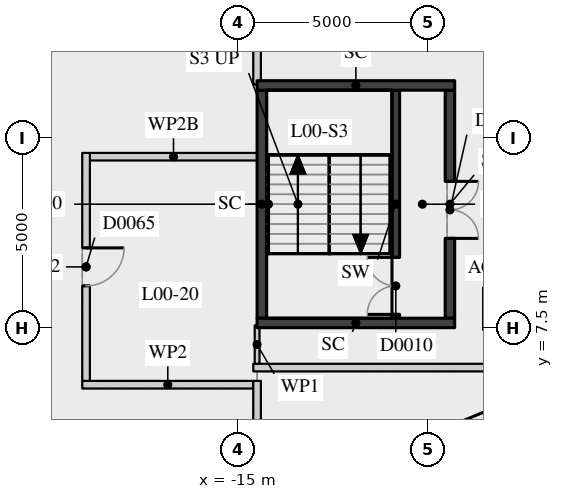
"""IFC4 building model, lengths in metres.
Left out: names, types, materials, properties, quantities, classifications, styles, units other than length and angle.
Written with IfcOpenShell. Run it as: python <this file> out.ifc"""

import sys

from ifc_helpers import new_model, si_unit, direction, frame, frame_2d, origin, place, context, subcontext, project, spatial, rectangle, extrude, element, fill, save


model = new_model("IFC4")
c1 = context("Model", 3, precision=1e-05, world=origin(), true_north=direction((0.0, 1.0)))
c2 = subcontext(c1, "Body", "Model", "MODEL_VIEW")
j1 = project(units=[si_unit("LENGTHUNIT", "METRE"), si_unit("PLANEANGLEUNIT", "RADIAN")], contexts=[c1])
p1 = place(None, origin())
s1 = spatial("IfcSite", under=j1, at=p1, CompositionType="ELEMENT")
p2 = place(p1, origin())
s2 = spatial("IfcBuilding", under=s1, at=p2, CompositionType="ELEMENT")
p3 = place(p2, origin())
s3 = spatial("IfcBuildingStorey", under=s2, at=p3, CompositionType="ELEMENT", Elevation=0.0)
p4 = place(p3, frame((-10.85, 7.75, 0.0), z_axis=(0.0, 0.0, 1.0), x_axis=(0.0, 1.0, 0.0)))
e1 = element("IfcWall", 1, at=p4, inside=s3, PredefinedType="SHEAR", context=c2, shape_type="SweptSolid", body=[
    extrude(rectangle(XDim=6.0, YDim=0.2, at=frame_2d((3.0, 0.0))), origin(), (0.0, 0.0, 1.0), 7.09),
])
p5 = place(p4, frame((0.1, 0.0, 0.0)))
e2 = element("IfcOpeningElement", 2, at=p5, cuts=e1, PredefinedType="OPENING", context=c2, shape_type="SweptSolid", body=[
    extrude(rectangle(XDim=1.5, YDim=2.1, at=frame_2d((0.75, 1.05))), frame((0.0, 0.11, 0.0), z_axis=(0.0, -1.0, 0.0), x_axis=(1.0, 0.0, 0.0)), (0.0, 0.0, 1.0), 0.22),
])
p6 = place(p3, frame((-14.375, 7.75, 0.0), z_axis=(0.0, 0.0, 1.0), x_axis=(0.0, 1.0, 0.0)))
e3 = element("IfcWall", 3, at=p6, inside=s3, PredefinedType="SHEAR", context=c2, shape_type="SweptSolid", body=[
    extrude(rectangle(XDim=6.0, YDim=0.25, at=frame_2d((3.0, 0.0))), origin(), (0.0, 0.0, 1.0), 7.09),
])
p7 = place(p3, frame((-9.425, 7.75, 0.0), z_axis=(0.0, 0.0, 1.0), x_axis=(0.0, 1.0, 0.0)))
e4 = element("IfcWall", 4, at=p7, inside=s3, PredefinedType="SHEAR", context=c2, shape_type="SweptSolid", body=[
    extrude(rectangle(XDim=6.0, YDim=0.25, at=frame_2d((3.0, 0.0))), origin(), (0.0, 0.0, 1.0), 7.09),
])
p8 = place(p7, frame((2.1, 0.0, 0.0)))
e5 = element("IfcOpeningElement", 5, at=p8, cuts=e4, PredefinedType="OPENING", context=c2, shape_type="SweptSolid", body=[
    extrude(rectangle(XDim=1.5, YDim=2.1, at=frame_2d((0.75, 1.05))), frame((0.0, 0.135, 0.0), z_axis=(0.0, -1.0, 0.0), x_axis=(1.0, 0.0, 0.0)), (0.0, 0.0, 1.0), 0.27),
])
for number, where, z_axis, x_axis in (
    (6, (-14.5, 13.875, 0.0), (0.0, 0.0, 1.0), (1.0, 0.0, 0.0)),
    (7, (-14.5, 7.625, 0.0), (0.0, 0.0, 1.0), (1.0, 0.0, 0.0)),
):
    element("IfcWall", number, at=place(p3, frame(where, z_axis=z_axis, x_axis=x_axis)), inside=s3, PredefinedType="SHEAR", context=c2, shape_type="SweptSolid", body=[
        extrude(rectangle(XDim=5.2, YDim=0.25, at=frame_2d((2.6, 0.0))), origin(), (0.0, 0.0, 1.0), 7.09),
    ])
p9 = place(p3, frame((-19.1, 6.0, 0.0), z_axis=(0.0, 0.0, 1.0), x_axis=(1.0, 0.0, 0.0)))
e8 = element("IfcWall", 8, at=p9, inside=s3, PredefinedType="PARTITIONING", context=c2, shape_type="SweptSolid", body=[
    extrude(rectangle(XDim=4.5, YDim=0.2, at=frame_2d((2.25, 0.0))), origin(), (0.0, 0.0, 1.0), 7.09),
])
p10 = place(p3, frame((-14.6, 6.45, 0.0), z_axis=(0.0, 0.0, 1.0), x_axis=(1.0, 0.0, 0.0)))
e9 = element("IfcWall", 9, at=p10, inside=s3, PredefinedType="PARTITIONING", context=c2, shape_type="SweptSolid", body=[
    extrude(rectangle(XDim=18.602, YDim=0.2, at=frame_2d((9.301, 0.0))), origin(), (0.0, 0.0, 1.0), 7.09),
])
p11 = place(p10, frame((8.101, 0.0, 0.0)))
e10 = element("IfcOpeningElement", 10, at=p11, cuts=e9, PredefinedType="OPENING", context=c2, shape_type="SweptSolid", body=[
    extrude(rectangle(XDim=2.4, YDim=2.4, at=frame_2d((1.2, 1.2))), frame((0.0, 0.11, 0.0), z_axis=(0.0, -1.0, 0.0), x_axis=(1.0, 0.0, 0.0)), (0.0, 0.0, 1.0), 0.22),
])
p12 = place(p3, frame((-18.9, 12.0, 0.0), z_axis=(0.0, 0.0, 1.0), x_axis=(1.0, 0.0, 0.0)))
e11 = element("IfcWall", 11, at=p12, inside=s3, PredefinedType="PARTITIONING", context=c2, shape_type="SweptSolid", body=[
    extrude(rectangle(XDim=4.402, YDim=0.2, at=frame_2d((2.201, 0.0))), origin(), (0.0, 0.0, 1.0), 6.54),
])
p13 = place(p3, frame((-19.0, 6.1, 0.0), z_axis=(0.0, 0.0, 1.0), x_axis=(0.0, 1.0, 0.0)))
e12 = element("IfcWall", 12, at=p13, inside=s3, PredefinedType="PARTITIONING", context=c2, shape_type="SweptSolid", body=[
    extrude(rectangle(XDim=6.0, YDim=0.2, at=frame_2d((3.0, 0.0))), origin(), (0.0, 0.0, 1.0), 7.09),
])
p14 = place(p13, frame((2.5, 0.0, 0.0)))
e13 = element("IfcOpeningElement", 13, at=p14, cuts=e12, PredefinedType="OPENING", context=c2, shape_type="SweptSolid", body=[
    extrude(rectangle(XDim=1.0, YDim=2.1, at=frame_2d((0.5, 1.05))), frame((0.0, 0.11, 0.0), z_axis=(0.0, -1.0, 0.0), x_axis=(1.0, 0.0, 0.0)), (0.0, 0.0, 1.0), 0.22),
])
p15 = place(p3, frame((-14.5, -7.6, 0.0), z_axis=(0.0, 0.0, 1.0), x_axis=(0.0, 1.0, 0.0)))
e14 = element("IfcWall", 14, at=p15, inside=s3, PredefinedType="PARTITIONING", context=c2, shape_type="SweptSolid", body=[
    extrude(rectangle(XDim=13.7, YDim=0.2, at=frame_2d((6.85, 0.0))), origin(), (0.0, 0.0, 1.0), 7.09),
])
p16 = place(p15, frame((5.2, 0.0, 0.0)))
e15 = element("IfcOpeningElement", 15, at=p16, cuts=e14, PredefinedType="OPENING", context=c2, shape_type="SweptSolid", body=[
    extrude(rectangle(XDim=1.8, YDim=2.4, at=frame_2d((0.9, 1.2))), frame((0.0, 0.11, 0.0), z_axis=(0.0, -1.0, 0.0), x_axis=(1.0, 0.0, 0.0)), (0.0, 0.0, 1.0), 0.22),
])
p17 = place(p3, frame((-14.5, 6.55, 0.0), z_axis=(0.0, 0.0, 1.0), x_axis=(0.0, 1.0, 0.0)))
e16 = element("IfcWall", 16, at=p17, inside=s3, PredefinedType="PARTITIONING", context=c2, shape_type="SweptSolid", body=[
    extrude(rectangle(XDim=1.012, YDim=0.125, at=frame_2d((0.506, 0.0))), origin(), (0.0, 0.0, 1.0), 7.09),
])
p18 = place(p3, frame((-14.5, 13.9, 0.0), z_axis=(0.0, 0.0, 1.0), x_axis=(0.0, 1.0, 0.0)))
e17 = element("IfcWall", 17, at=p18, inside=s3, PredefinedType="PARTITIONING", context=c2, shape_type="SweptSolid", body=[
    extrude(rectangle(XDim=17.903, YDim=0.2, at=frame_2d((8.952, 0.0))), origin(), (0.0, 0.0, 1.0), 6.64),
])
p19 = place(p18, frame((7.752, 0.0, 0.0)))
e18 = element("IfcOpeningElement", 18, at=p19, cuts=e17, PredefinedType="OPENING", context=c2, shape_type="SweptSolid", body=[
    extrude(rectangle(XDim=2.4, YDim=2.4, at=frame_2d((1.2, 1.2))), frame((0.0, 0.11, 0.0), z_axis=(0.0, -1.0, 0.0), x_axis=(1.0, 0.0, 0.0)), (0.0, 0.0, 1.0), 0.22),
])
p20 = place(p5, origin())
e19 = element("IfcDoor", 19, at=p20, inside=s3, OperationType="DOUBLE_DOOR_SINGLE_SWING", PredefinedType="DOOR", context=c2, shape_type="SweptSolid", body=[
    extrude(rectangle(XDim=1.5, YDim=2.1, at=frame_2d((0.75, 1.05))), frame((0.0, 0.025, 0.0), z_axis=(0.0, -1.0, 0.0), x_axis=(1.0, 0.0, 0.0)), (0.0, 0.0, 1.0), 0.05),
])
fill(e2, e19)
p21 = place(p8, origin())
e20 = element("IfcDoor", 20, at=p21, inside=s3, OperationType="DOUBLE_DOOR_SINGLE_SWING", PredefinedType="DOOR", context=c2, shape_type="SweptSolid", body=[
    extrude(rectangle(XDim=1.5, YDim=2.1, at=frame_2d((0.75, 1.05))), frame((0.0, 0.025, 0.0), z_axis=(0.0, -1.0, 0.0), x_axis=(1.0, 0.0, 0.0)), (0.0, 0.0, 1.0), 0.05),
])
fill(e5, e20)
p22 = place(p14, origin())
e21 = element("IfcDoor", 21, at=p22, inside=s3, OperationType="SINGLE_SWING_LEFT", PredefinedType="DOOR", context=c2, shape_type="SweptSolid", body=[
    extrude(rectangle(XDim=1.0, YDim=2.1, at=frame_2d((0.5, 1.05))), frame((0.0, 0.025, 0.0), z_axis=(0.0, -1.0, 0.0), x_axis=(1.0, 0.0, 0.0)), (0.0, 0.0, 1.0), 0.05),
])
fill(e13, e21)
save(model, sys.argv[1])
